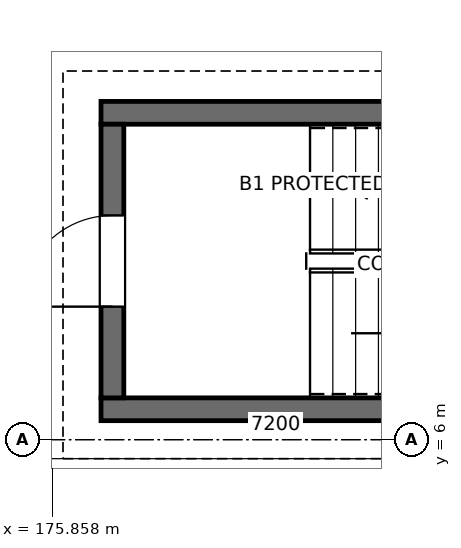
"""IFC4 building model, lengths in metres.
Left out: names, types, materials, properties, quantities, classifications, styles, units other than length and angle.
Written with IfcOpenShell. Run it as: python <this file> out.ifc"""

import sys

from ifc_helpers import new_model, si_unit, direction, frame, frame_2d, origin, place, context, subcontext, project, spatial, rectangle, extrude, element, fill, save


model = new_model("IFC4")
c1 = context("Model", 3, precision=1e-05, world=origin(), true_north=direction((0.0, 1.0)))
c2 = subcontext(c1, "Body", "Model", "MODEL_VIEW")
j1 = project(units=[si_unit("LENGTHUNIT", "METRE"), si_unit("PLANEANGLEUNIT", "RADIAN")], contexts=[c1])
p1 = place(None, origin())
s1 = spatial("IfcSite", under=j1, at=p1, CompositionType="ELEMENT")
p2 = place(p1, origin())
s2 = spatial("IfcBuilding", under=s1, at=p2, CompositionType="ELEMENT")
p3 = place(p2, frame((0.0, 0.0, -4.5)))
s3 = spatial("IfcBuildingStorey", under=s2, at=p3, CompositionType="ELEMENT", Elevation=-4.5)
for number, where, z_axis, x_axis in (
    (1, (185.9, 6.4, 0.0), (0.0, 0.0, 1.0), (-1.0, 0.0, 0.0)),
    (2, (176.5, 10.3, 0.0), (0.0, 0.0, 1.0), (1.0, 0.0, 0.0)),
):
    element("IfcWall", number, at=place(p3, frame(where, z_axis=z_axis, x_axis=x_axis)), inside=s3, PredefinedType="SOLIDWALL", context=c2, shape_type="SweptSolid", body=[
        extrude(rectangle(XDim=9.4, YDim=0.3, at=frame_2d((4.7, 0.0))), origin(), (0.0, 0.0, 1.0), 4.18),
    ])
p4 = place(p3, frame((176.65, 6.55, 0.0), z_axis=(0.0, 0.0, 1.0), x_axis=(0.0, 1.0, 0.0)))
e3 = element("IfcWall", 3, at=p4, inside=s3, PredefinedType="SOLIDWALL", context=c2, shape_type="SweptSolid", body=[
    extrude(rectangle(XDim=3.6, YDim=0.3, at=frame_2d((1.8, 0.0))), origin(), (0.0, 0.0, 1.0), 4.18),
])
p5 = place(p4, frame((1.2, 0.0, 0.0)))
e4 = element("IfcOpeningElement", 4, at=p5, cuts=e3, PredefinedType="OPENING", context=c2, shape_type="SweptSolid", body=[
    extrude(rectangle(XDim=1.2, YDim=2.2, at=frame_2d((0.6, 1.1))), frame((0.0, 0.16, 0.0), z_axis=(0.0, -1.0, 0.0), x_axis=(1.0, 0.0, 0.0)), (0.0, 0.0, 1.0), 0.32),
])
p6 = place(p5, origin())
e5 = element("IfcDoor", 5, at=p6, inside=s3, OperationType="SINGLE_SWING_LEFT", PredefinedType="DOOR", context=c2, shape_type="SweptSolid", body=[
    extrude(rectangle(XDim=1.2, YDim=2.2, at=frame_2d((0.6, 1.1))), frame((0.0, 0.025, 0.0), z_axis=(0.0, -1.0, 0.0), x_axis=(1.0, 0.0, 0.0)), (0.0, 0.0, 1.0), 0.05),
])
fill(e4, e5)
save(model, sys.argv[1])
